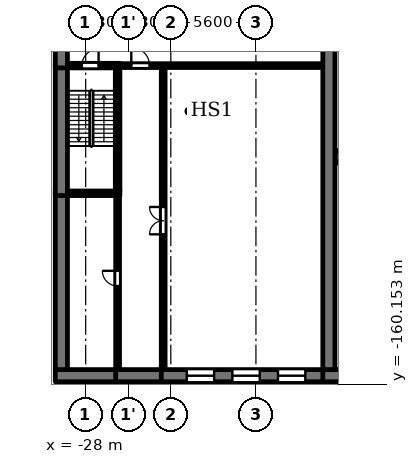
"""IFC4 building model, lengths in metres.
Left out: names, types, materials, properties, quantities, classifications, styles, units other than length and angle.
Written with IfcOpenShell. Run it as: python <this file> out.ifc"""

import sys

from ifc_helpers import new_model, si_unit, direction, frame, frame_2d, origin, place, context, subcontext, project, spatial, rectangle, extrude, element, fill, save


model = new_model("IFC4")
c1 = context("Model", 3, precision=1e-05, world=origin(), true_north=direction((0.0, 1.0)))
c2 = subcontext(c1, "Body", "Model", "MODEL_VIEW")
j1 = project(units=[si_unit("LENGTHUNIT", "METRE"), si_unit("PLANEANGLEUNIT", "RADIAN")], contexts=[c1])
p1 = place(None, origin())
s1 = spatial("IfcSite", under=j1, at=p1, CompositionType="ELEMENT")
p2 = place(p1, origin())
s2 = spatial("IfcBuilding", under=s1, at=p2, CompositionType="ELEMENT")
p3 = place(p2, frame((0.0, 0.0, 16.1)))
s3 = spatial("IfcBuildingStorey", under=s2, at=p3, CompositionType="ELEMENT", Elevation=16.1)
p4 = place(p3, frame((-30.0, -159.6, 0.0), z_axis=(0.0, 0.0, 1.0), x_axis=(1.0, 0.0, 0.0)))
e1 = element("IfcWall", 1, at=p4, inside=s3, PredefinedType="SOLIDWALL", context=c2, shape_type="SweptSolid", body=[
    extrude(rectangle(XDim=4.225, YDim=0.8, at=frame_2d((2.112, 0.0))), origin(), (0.0, 0.0, 1.0), 4.45),
])
p5 = place(p3, frame((-26.025, -159.6, 0.0), z_axis=(0.0, 0.0, 1.0), x_axis=(1.0, 0.0, 0.0)))
e2 = element("IfcWall", 2, at=p5, inside=s3, PredefinedType="SOLIDWALL", context=c2, shape_type="SweptSolid", body=[
    extrude(rectangle(XDim=3.25, YDim=0.8, at=frame_2d((1.625, 0.0))), origin(), (0.0, 0.0, 1.0), 4.45),
])
p6 = place(p3, frame((-23.025, -159.6, 0.0), z_axis=(0.0, 0.0, 1.0), x_axis=(1.0, 0.0, 0.0)))
e3 = element("IfcWall", 3, at=p6, inside=s3, PredefinedType="SOLIDWALL", context=c2, shape_type="SweptSolid", body=[
    extrude(rectangle(XDim=11.425, YDim=0.8, at=frame_2d((5.712, 0.0))), origin(), (0.0, 0.0, 1.0), 4.45),
])
p7 = place(p6, frame((1.675, 0.0, 0.9)))
e4 = element("IfcOpeningElement", 4, at=p7, cuts=e3, PredefinedType="OPENING", context=c2, shape_type="SweptSolid", body=[
    extrude(rectangle(XDim=1.8, YDim=1.5, at=frame_2d((0.9, 0.75))), frame((0.0, 0.41, 0.0), z_axis=(0.0, -1.0, 0.0), x_axis=(1.0, 0.0, 0.0)), (0.0, 0.0, 1.0), 0.82),
])
p8 = place(p6, frame((4.675, 0.0, 0.9)))
e5 = element("IfcOpeningElement", 5, at=p8, cuts=e3, PredefinedType="OPENING", context=c2, shape_type="SweptSolid", body=[
    extrude(rectangle(XDim=1.8, YDim=1.5, at=frame_2d((0.9, 0.75))), frame((0.0, 0.41, 0.0), z_axis=(0.0, -1.0, 0.0), x_axis=(1.0, 0.0, 0.0)), (0.0, 0.0, 1.0), 0.82),
])
p9 = place(p6, frame((7.675, 0.0, 0.9)))
e6 = element("IfcOpeningElement", 6, at=p9, cuts=e3, PredefinedType="OPENING", context=c2, shape_type="SweptSolid", body=[
    extrude(rectangle(XDim=1.8, YDim=1.5, at=frame_2d((0.9, 0.75))), frame((0.0, 0.41, 0.0), z_axis=(0.0, -1.0, 0.0), x_axis=(1.0, 0.0, 0.0)), (0.0, 0.0, 1.0), 0.82),
])
p10 = place(p3, frame((-12.4, -159.6, 0.0), z_axis=(0.0, 0.0, 1.0), x_axis=(1.0, 0.0, 0.0)))
e7 = element("IfcWall", 7, at=p10, inside=s3, PredefinedType="SOLIDWALL", context=c2, shape_type="SweptSolid", body=[
    extrude(rectangle(XDim=24.8, YDim=0.8, at=frame_2d((12.4, 0.0))), origin(), (0.0, 0.0, 1.0), 4.8),
])
p11 = place(p3, frame((-29.2, -147.6, 0.0), z_axis=(0.0, 0.0, 1.0), x_axis=(1.0, 0.0, 0.0)))
e8 = element("IfcWall", 8, at=p11, inside=s3, PredefinedType="SOLIDWALL", context=c2, shape_type="SweptSolid", body=[
    extrude(rectangle(XDim=3.45, YDim=0.3, at=frame_2d((1.725, 0.0))), origin(), (0.0, 0.0, 1.0), 4.45),
])
p12 = place(p3, frame((-11.6, -145.2, 0.0), z_axis=(0.0, 0.0, 1.0), x_axis=(1.0, 0.0, 0.0)))
e9 = element("IfcWall", 9, at=p12, inside=s3, PredefinedType="SOLIDWALL", context=c2, shape_type="SweptSolid", body=[
    extrude(rectangle(XDim=23.2, YDim=0.8, at=frame_2d((11.6, 0.0))), origin(), (0.0, 0.0, 1.0), 4.8),
])
p13 = place(p3, frame((-29.2, -139.2, 0.0), z_axis=(0.0, 0.0, 1.0), x_axis=(1.0, 0.0, 0.0)))
e10 = element("IfcWall", 10, at=p13, inside=s3, PredefinedType="SOLIDWALL", context=c2, shape_type="SweptSolid", body=[
    extrude(rectangle(XDim=3.45, YDim=0.3, at=frame_2d((1.725, 0.0))), origin(), (0.0, 0.0, 1.0), 4.45),
])
p14 = place(p13, frame((0.95, 0.0, 0.0)))
e11 = element("IfcOpeningElement", 11, at=p14, cuts=e10, PredefinedType="OPENING", context=c2, shape_type="SweptSolid", body=[
    extrude(rectangle(XDim=1.1, YDim=2.1, at=frame_2d((0.55, 1.05))), frame((0.0, 0.16, 0.0), z_axis=(0.0, -1.0, 0.0), x_axis=(1.0, 0.0, 0.0)), (0.0, 0.0, 1.0), 0.32),
])
p15 = place(p3, frame((-25.75, -139.2, 0.0), z_axis=(0.0, 0.0, 1.0), x_axis=(1.0, 0.0, 0.0)))
e12 = element("IfcWall", 12, at=p15, inside=s3, PredefinedType="SOLIDWALL", context=c2, shape_type="SweptSolid", body=[
    extrude(rectangle(XDim=13.35, YDim=0.25, at=frame_2d((6.675, 0.0))), origin(), (0.0, 0.0, 1.0), 4.45),
])
p16 = place(p15, frame((0.75, 0.0, 0.0)))
e13 = element("IfcOpeningElement", 13, at=p16, cuts=e12, PredefinedType="OPENING", context=c2, shape_type="SweptSolid", body=[
    extrude(rectangle(XDim=1.2, YDim=2.1, at=frame_2d((0.6, 1.05))), frame((0.0, 0.135, 0.0), z_axis=(0.0, -1.0, 0.0), x_axis=(1.0, 0.0, 0.0)), (0.0, 0.0, 1.0), 0.27),
])
p17 = place(p3, frame((-29.6, -159.2, 0.0), z_axis=(0.0, 0.0, 1.0), x_axis=(0.0, 1.0, 0.0)))
e14 = element("IfcWall", 14, at=p17, inside=s3, PredefinedType="SOLIDWALL", context=c2, shape_type="SweptSolid", body=[
    extrude(rectangle(XDim=11.75, YDim=0.8, at=frame_2d((5.875, 0.0))), origin(), (0.0, 0.0, 1.0), 4.45),
])
p18 = place(p3, frame((-29.6, -147.75, 0.0), z_axis=(0.0, 0.0, 1.0), x_axis=(0.0, 1.0, 0.0)))
e15 = element("IfcWall", 15, at=p18, inside=s3, PredefinedType="SOLIDWALL", context=c2, shape_type="SweptSolid", body=[
    extrude(rectangle(XDim=8.7, YDim=0.8, at=frame_2d((4.35, 0.0))), origin(), (0.0, 0.0, 1.0), 4.45),
])
p19 = place(p3, frame((-29.6, -139.35, 0.0), z_axis=(0.0, 0.0, 1.0), x_axis=(0.0, 1.0, 0.0)))
e16 = element("IfcWall", 16, at=p19, inside=s3, PredefinedType="SOLIDWALL", context=c2, shape_type="SweptSolid", body=[
    extrude(rectangle(XDim=8.275, YDim=0.8, at=frame_2d((4.137, 0.0))), origin(), (0.0, 0.0, 1.0), 4.45),
])
p20 = place(p19, frame((1.15, 0.0, 0.6)))
e17 = element("IfcOpeningElement", 17, at=p20, cuts=e16, PredefinedType="OPENING", context=c2, shape_type="SweptSolid", body=[
    extrude(rectangle(XDim=2.4, YDim=3.2, at=frame_2d((1.2, 1.6))), frame((0.0, 0.41, 0.0), z_axis=(0.0, -1.0, 0.0), x_axis=(1.0, 0.0, 0.0)), (0.0, 0.0, 1.0), 0.82),
])
p21 = place(p19, frame((4.75, 0.0, 0.6)))
e18 = element("IfcOpeningElement", 18, at=p21, cuts=e16, PredefinedType="OPENING", context=c2, shape_type="SweptSolid", body=[
    extrude(rectangle(XDim=2.4, YDim=3.2, at=frame_2d((1.2, 1.6))), frame((0.0, 0.41, 0.0), z_axis=(0.0, -1.0, 0.0), x_axis=(1.0, 0.0, 0.0)), (0.0, 0.0, 1.0), 0.82),
])
p22 = place(p3, frame((-25.9, -159.2, 0.0), z_axis=(0.0, 0.0, 1.0), x_axis=(0.0, 1.0, 0.0)))
e19 = element("IfcWall", 19, at=p22, inside=s3, PredefinedType="SOLIDWALL", context=c2, shape_type="SweptSolid", body=[
    extrude(rectangle(XDim=11.45, YDim=0.25, at=frame_2d((5.725, 0.0))), origin(), (0.0, 0.0, 1.0), 4.45),
])
p23 = place(p22, frame((5.5, 0.0, 0.0)))
e20 = element("IfcOpeningElement", 20, at=p23, cuts=e19, PredefinedType="OPENING", context=c2, shape_type="SweptSolid", body=[
    extrude(rectangle(XDim=1.0, YDim=2.1, at=frame_2d((0.5, 1.05))), frame((0.0, 0.135, 0.0), z_axis=(0.0, -1.0, 0.0), x_axis=(1.0, 0.0, 0.0)), (0.0, 0.0, 1.0), 0.27),
])
p24 = place(p3, frame((-25.9, -147.45, 0.0), z_axis=(0.0, 0.0, 1.0), x_axis=(0.0, 1.0, 0.0)))
e21 = element("IfcWall", 21, at=p24, inside=s3, PredefinedType="SOLIDWALL", context=c2, shape_type="SweptSolid", body=[
    extrude(rectangle(XDim=8.225, YDim=0.3, at=frame_2d((4.112, 0.0))), origin(), (0.0, 0.0, 1.0), 4.45),
])
p25 = place(p3, frame((-22.9, -159.2, 0.0), z_axis=(0.0, 0.0, 1.0), x_axis=(0.0, 1.0, 0.0)))
e22 = element("IfcWall", 22, at=p25, inside=s3, PredefinedType="SOLIDWALL", context=c2, shape_type="SweptSolid", body=[
    extrude(rectangle(XDim=19.875, YDim=0.25, at=frame_2d((9.938, 0.0))), origin(), (0.0, 0.0, 1.0), 4.45),
])
p26 = place(p25, frame((8.9, 0.0, 0.0)))
e23 = element("IfcOpeningElement", 23, at=p26, cuts=e22, PredefinedType="OPENING", context=c2, shape_type="SweptSolid", body=[
    extrude(rectangle(XDim=1.8, YDim=2.1, at=frame_2d((0.9, 1.05))), frame((0.0, 0.135, 0.0), z_axis=(0.0, -1.0, 0.0), x_axis=(1.0, 0.0, 0.0)), (0.0, 0.0, 1.0), 0.27),
])
p27 = place(p3, frame((-12.0, -159.2, 0.0), z_axis=(0.0, 0.0, 1.0), x_axis=(0.0, 1.0, 0.0)))
e24 = element("IfcWall", 24, at=p27, inside=s3, PredefinedType="SOLIDWALL", context=c2, shape_type="SweptSolid", body=[
    extrude(rectangle(XDim=34.125, YDim=0.8, at=frame_2d((17.062, 0.0))), origin(), (0.0, 0.0, 1.0), 4.8),
])
p28 = place(p7, origin())
e25 = element("IfcWindow", 25, at=p28, inside=s3, PartitioningType="SINGLE_PANEL", PredefinedType="WINDOW", context=c2, shape_type="SweptSolid", body=[
    extrude(rectangle(XDim=1.8, YDim=1.5, at=frame_2d((0.9, 0.75))), frame((0.0, 0.03, 0.0), z_axis=(0.0, -1.0, 0.0), x_axis=(1.0, 0.0, 0.0)), (0.0, 0.0, 1.0), 0.06),
])
fill(e4, e25)
p29 = place(p8, origin())
e26 = element("IfcWindow", 26, at=p29, inside=s3, PartitioningType="SINGLE_PANEL", PredefinedType="WINDOW", context=c2, shape_type="SweptSolid", body=[
    extrude(rectangle(XDim=1.8, YDim=1.5, at=frame_2d((0.9, 0.75))), frame((0.0, 0.03, 0.0), z_axis=(0.0, -1.0, 0.0), x_axis=(1.0, 0.0, 0.0)), (0.0, 0.0, 1.0), 0.06),
])
fill(e5, e26)
p30 = place(p9, origin())
e27 = element("IfcWindow", 27, at=p30, inside=s3, PartitioningType="SINGLE_PANEL", PredefinedType="WINDOW", context=c2, shape_type="SweptSolid", body=[
    extrude(rectangle(XDim=1.8, YDim=1.5, at=frame_2d((0.9, 0.75))), frame((0.0, 0.03, 0.0), z_axis=(0.0, -1.0, 0.0), x_axis=(1.0, 0.0, 0.0)), (0.0, 0.0, 1.0), 0.06),
])
fill(e6, e27)
p31 = place(p14, origin())
e28 = element("IfcDoor", 28, at=p31, inside=s3, OperationType="SINGLE_SWING_RIGHT", PredefinedType="DOOR", context=c2, shape_type="SweptSolid", body=[
    extrude(rectangle(XDim=1.1, YDim=2.1, at=frame_2d((0.55, 1.05))), frame((0.0, 0.025, 0.0), z_axis=(0.0, -1.0, 0.0), x_axis=(1.0, 0.0, 0.0)), (0.0, 0.0, 1.0), 0.05),
])
fill(e11, e28)
p32 = place(p16, origin())
e29 = element("IfcDoor", 29, at=p32, inside=s3, OperationType="SINGLE_SWING_LEFT", PredefinedType="DOOR", context=c2, shape_type="SweptSolid", body=[
    extrude(rectangle(XDim=1.2, YDim=2.1, at=frame_2d((0.6, 1.05))), frame((0.0, 0.025, 0.0), z_axis=(0.0, -1.0, 0.0), x_axis=(1.0, 0.0, 0.0)), (0.0, 0.0, 1.0), 0.05),
])
fill(e13, e29)
p33 = place(p26, origin())
e30 = element("IfcDoor", 30, at=p33, inside=s3, OperationType="DOUBLE_DOOR_SINGLE_SWING", PredefinedType="DOOR", context=c2, shape_type="SweptSolid", body=[
    extrude(rectangle(XDim=1.8, YDim=2.1, at=frame_2d((0.9, 1.05))), frame((0.0, 0.025, 0.0), z_axis=(0.0, -1.0, 0.0), x_axis=(1.0, 0.0, 0.0)), (0.0, 0.0, 1.0), 0.05),
])
fill(e23, e30)
p34 = place(p23, origin())
e31 = element("IfcDoor", 31, at=p34, inside=s3, OperationType="SINGLE_SWING_RIGHT", PredefinedType="DOOR", context=c2, shape_type="SweptSolid", body=[
    extrude(rectangle(XDim=1.0, YDim=2.1, at=frame_2d((0.5, 1.05))), frame((0.0, 0.025, 0.0), z_axis=(0.0, -1.0, 0.0), x_axis=(1.0, 0.0, 0.0)), (0.0, 0.0, 1.0), 0.05),
])
fill(e20, e31)
save(model, sys.argv[1])
